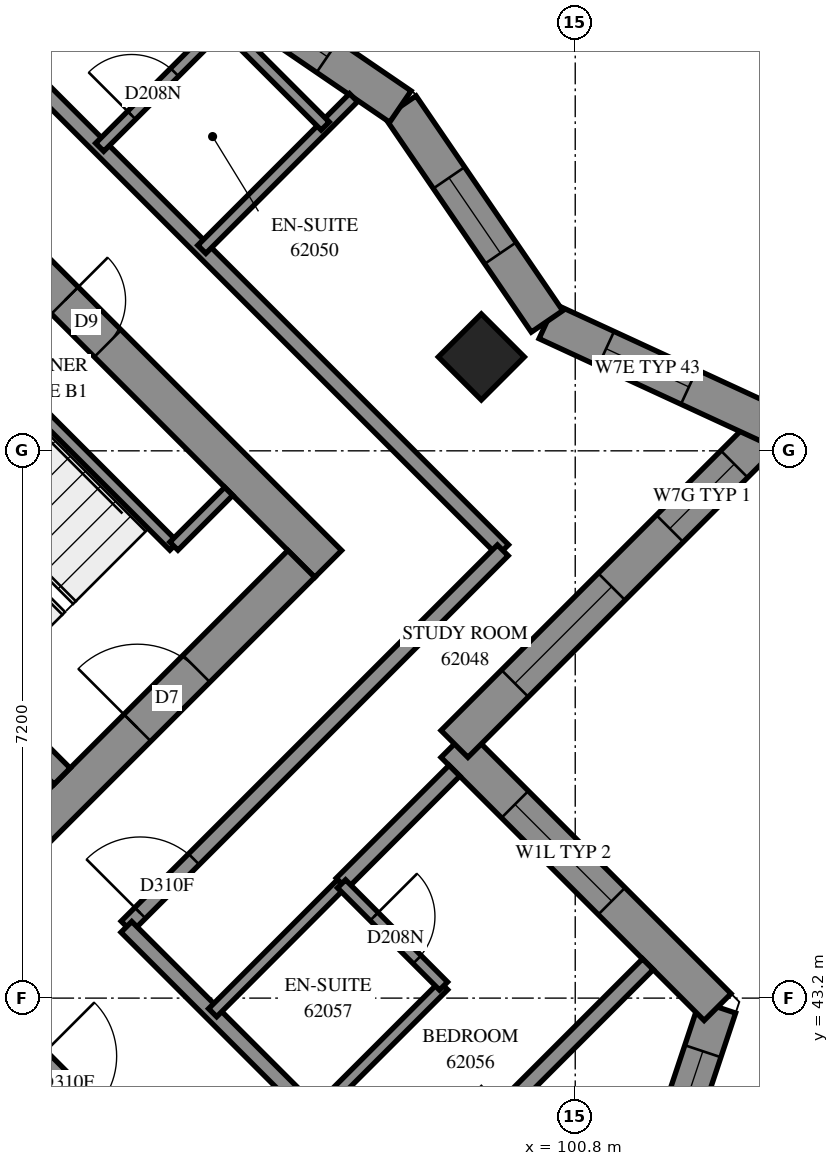
"""IFC4 building model, lengths in metres.
Left out: names, types, materials, properties, quantities, classifications, styles, units other than length and angle.
Written with IfcOpenShell. Run it as: python <this file> out.ifc"""

import sys

from ifc_helpers import new_model, si_unit, direction, frame, frame_2d, origin, origin_2d, place, context, subcontext, project, spatial, polyline, rectangle, outline, extrude, element, fill, save


model = new_model("IFC4")
c1 = context("Model", 3, precision=1e-05, world=origin(), true_north=direction((0.0, 1.0)))
c2 = subcontext(c1, "Body", "Model", "MODEL_VIEW")
j1 = project(units=[si_unit("LENGTHUNIT", "METRE"), si_unit("PLANEANGLEUNIT", "RADIAN")], contexts=[c1])
p1 = place(None, origin())
s1 = spatial("IfcSite", under=j1, at=p1, CompositionType="ELEMENT")
p2 = place(p1, origin())
s2 = spatial("IfcBuilding", under=s1, at=p2, CompositionType="ELEMENT")
p3 = place(p2, frame((0.0, 0.0, 227.0)))
s3 = spatial("IfcBuildingStorey", under=s2, at=p3, CompositionType="ELEMENT", Elevation=227.0)
p4 = place(p3, frame((99.565, 51.635, 0.0), z_axis=(0.0, 0.0, 1.0), x_axis=(0.7071067812, -0.7071067812, 0.0)))
e1 = element("IfcColumn", 1, at=p4, inside=s3, PredefinedType="COLUMN", context=c2, shape_type="SweptSolid", body=[
    extrude(rectangle(XDim=0.8, YDim=0.8, at=origin_2d()), origin(), (0.0, 0.0, 1.0), 3.1),
])
p5 = place(p3, frame((86.66, 59.802, -0.3), z_axis=(0.0, 0.0, 1.0), x_axis=(0.7071067812, -0.7071067812, 0.0)))
e2 = element("IfcWall", 2, at=p5, inside=s3, PredefinedType="SHEAR", context=c2, shape_type="SweptSolid", body=[
    extrude(rectangle(XDim=15.4, YDim=0.5, at=frame_2d((7.7, 0.0))), origin(), (0.0, 0.0, 1.0), 2.7),
])
p6 = place(p5, frame((10.5, 0.0, 0.3)))
e3 = element("IfcOpeningElement", 3, at=p6, cuts=e2, PredefinedType="OPENING", context=c2, shape_type="SweptSolid", body=[
    extrude(rectangle(XDim=0.8, YDim=2.1, at=frame_2d((0.4, 1.05))), frame((0.0, 0.26, 0.0), z_axis=(0.0, -1.0, 0.0), x_axis=(1.0, 0.0, 0.0)), (0.0, 0.0, 1.0), 0.52),
])
p7 = place(p3, frame((87.013, 38.731, -0.3), z_axis=(0.0, 0.0, 1.0), x_axis=(0.7071067812, 0.7071067812, 0.0)))
e4 = element("IfcWall", 4, at=p7, inside=s3, PredefinedType="SHEAR", context=c2, shape_type="SweptSolid", body=[
    extrude(rectangle(XDim=14.4, YDim=0.5, at=frame_2d((7.2, 0.0))), origin(), (0.0, 0.0, 1.0), 2.7),
])
p8 = place(p7, frame((4.55, 0.0, 0.3)))
e5 = element("IfcOpeningElement", 5, at=p8, cuts=e4, PredefinedType="OPENING", context=c2, shape_type="SweptSolid", body=[
    extrude(rectangle(XDim=1.1, YDim=2.1, at=frame_2d((0.55, 1.05))), frame((0.0, 0.26, 0.0), z_axis=(0.0, -1.0, 0.0), x_axis=(1.0, 0.0, 0.0)), (0.0, 0.0, 1.0), 0.52),
])
p9 = place(p7, frame((11.35, 0.0, 0.3)))
e6 = element("IfcOpeningElement", 6, at=p9, cuts=e4, PredefinedType="OPENING", context=c2, shape_type="SweptSolid", body=[
    extrude(rectangle(XDim=1.1, YDim=2.1, at=frame_2d((0.55, 1.05))), frame((0.0, 0.26, 0.0), z_axis=(0.0, -1.0, 0.0), x_axis=(1.0, 0.0, 0.0)), (0.0, 0.0, 1.0), 0.52),
])
p10 = place(p3, frame((88.958, 51.211, 0.0), z_axis=(0.0, 0.0, 1.0), x_axis=(0.7070998367, -0.7071137256, 0.0)))
e7 = element("IfcWall", 7, at=p10, inside=s3, PredefinedType="SOLIDWALL", context=c2, shape_type="SweptSolid", body=[
    extrude(rectangle(XDim=7.2, YDim=0.3, at=frame_2d((3.6, 0.0))), origin(), (0.0, 0.0, 1.0), 3.1),
])
p11 = place(p3, frame((101.062, 38.252, 0.0), z_axis=(0.0, 0.0, 1.0), x_axis=(0.3162395484, 0.9486793705, 0.0)))
e8 = element("IfcWall", 8, at=p11, inside=s3, PredefinedType="SOLIDWALL", context=c2, shape_type="SweptSolid", body=[
    extrude(outline(polyline([(-0.12, -0.25), (5.247, -0.25), (4.938, 0.25), (0.12, 0.25), (-0.12, -0.25)])), origin(), (0.0, 0.0, 1.0), 3.1),
])
p12 = place(p11, frame((1.68, 0.0, 0.45)))
e9 = element("IfcOpeningElement", 9, at=p12, cuts=e8, PredefinedType="OPENING", context=c2, shape_type="SweptSolid", body=[
    extrude(rectangle(XDim=1.3, YDim=2.5, at=frame_2d((0.65, 1.25))), frame((0.0, 0.26, 0.0), z_axis=(0.0, -1.0, 0.0), x_axis=(1.0, 0.0, 0.0)), (0.0, 0.0, 1.0), 0.52),
])
p13 = place(p11, frame((3.18, 0.0, 0.45)))
e10 = element("IfcOpeningElement", 10, at=p13, cuts=e8, PredefinedType="OPENING", context=c2, shape_type="SweptSolid", body=[
    extrude(rectangle(XDim=1.3, YDim=2.5, at=frame_2d((0.65, 1.25))), frame((0.0, 0.26, 0.0), z_axis=(0.0, -1.0, 0.0), x_axis=(1.0, 0.0, 0.0)), (0.0, 0.0, 1.0), 0.52),
])
p14 = place(p3, frame((102.673, 43.083, 0.0), z_axis=(0.0, 0.0, 1.0), x_axis=(-0.7071067812, 0.7071067812, 0.0)))
e11 = element("IfcWall", 11, at=p14, inside=s3, PredefinedType="SOLIDWALL", context=c2, shape_type="SweptSolid", body=[
    extrude(outline(polyline([(-0.154, -0.25), (4.646, -0.25), (5.146, 0.25), (0.154, 0.25), (-0.154, -0.25)])), origin(), (0.0, 0.0, 1.0), 3.1),
])
p15 = place(p14, frame((1.97, 0.0, 0.6)))
e12 = element("IfcOpeningElement", 12, at=p15, cuts=e11, PredefinedType="OPENING", context=c2, shape_type="SweptSolid", body=[
    extrude(rectangle(XDim=1.8, YDim=1.9, at=frame_2d((0.9, 0.95))), frame((0.0, 0.26, 0.0), z_axis=(0.0, -1.0, 0.0), x_axis=(1.0, 0.0, 0.0)), (0.0, 0.0, 1.0), 0.52),
])
p16 = place(p3, frame((99.211, 46.544, 0.0), z_axis=(0.0, 0.0, 1.0), x_axis=(0.7071067812, 0.7071067812, 0.0)))
e13 = element("IfcWall", 13, at=p16, inside=s3, PredefinedType="SOLIDWALL", context=c2, shape_type="SweptSolid", body=[
    extrude(outline(polyline([(0.25, -0.25), (6.28, -0.25), (5.563, 0.25), (-0.25, 0.25), (0.25, -0.25)])), origin(), (0.0, 0.0, 1.0), 3.1),
])
p17 = place(p16, frame((1.125, 0.0, 0.6)))
e14 = element("IfcOpeningElement", 14, at=p17, cuts=e13, PredefinedType="OPENING", context=c2, shape_type="SweptSolid", body=[
    extrude(rectangle(XDim=1.8, YDim=1.9, at=frame_2d((0.9, 0.95))), frame((0.0, 0.26, 0.0), z_axis=(0.0, -1.0, 0.0), x_axis=(1.0, 0.0, 0.0)), (0.0, 0.0, 1.0), 0.52),
])
p18 = place(p16, frame((4.006, 0.0, 0.6)))
e15 = element("IfcOpeningElement", 15, at=p18, cuts=e13, PredefinedType="OPENING", context=c2, shape_type="SweptSolid", body=[
    extrude(rectangle(XDim=1.2, YDim=1.9, at=frame_2d((0.6, 0.95))), frame((0.0, 0.26, 0.0), z_axis=(0.0, -1.0, 0.0), x_axis=(1.0, 0.0, 0.0)), (0.0, 0.0, 1.0), 0.52),
])
p19 = place(p3, frame((103.398, 50.731, 0.0), z_axis=(0.0, 0.0, 1.0), x_axis=(-0.9078591394, 0.4192753069, 0.0)))
e16 = element("IfcWall", 16, at=p19, inside=s3, PredefinedType="SOLIDWALL", context=c2, shape_type="SweptSolid", body=[
    extrude(outline(polyline([(-0.358, -0.25), (3.202, -0.25), (3.34, 0.25), (0.358, 0.25), (-0.358, -0.25)])), origin(), (0.0, 0.0, 1.0), 3.1),
])
p20 = place(p19, frame((1.215, 0.0, 0.45)))
e17 = element("IfcOpeningElement", 17, at=p20, cuts=e16, PredefinedType="OPENING", context=c2, shape_type="SweptSolid", body=[
    extrude(rectangle(XDim=1.2, YDim=2.5, at=frame_2d((0.6, 1.25))), frame((0.0, 0.26, 0.0), z_axis=(0.0, -1.0, 0.0), x_axis=(1.0, 0.0, 0.0)), (0.0, 0.0, 1.0), 0.52),
])
p21 = place(p3, frame((100.429, 52.103, 0.0), z_axis=(0.0, 0.0, 1.0), x_axis=(-0.563838178, 0.8258852881, 0.0)))
e18 = element("IfcWall", 18, at=p21, inside=s3, PredefinedType="SOLIDWALL", context=c2, shape_type="SweptSolid", body=[
    extrude(outline(polyline([(0.069, -0.25), (3.469, -0.25), (3.375, 0.25), (-0.069, 0.25), (0.069, -0.25)])), origin(), (0.0, 0.0, 1.0), 3.1),
])
p22 = place(p21, frame((1.087, 0.0, 0.45)))
e19 = element("IfcOpeningElement", 19, at=p22, cuts=e18, PredefinedType="OPENING", context=c2, shape_type="SweptSolid", body=[
    extrude(rectangle(XDim=1.2, YDim=2.5, at=frame_2d((0.6, 1.25))), frame((0.0, 0.26, 0.0), z_axis=(0.0, -1.0, 0.0), x_axis=(1.0, 0.0, 0.0)), (0.0, 0.0, 1.0), 0.52),
])
p23 = place(p3, frame((98.499, 54.929, 0.0), z_axis=(0.0, 0.0, 1.0), x_axis=(-0.8258911763, 0.5638295531, 0.0)))
e20 = element("IfcWall", 20, at=p23, inside=s3, PredefinedType="SOLIDWALL", context=c2, shape_type="SweptSolid", body=[
    extrude(outline(polyline([(-0.047, -0.25), (3.353, -0.25), (3.447, 0.25), (0.047, 0.25), (-0.047, -0.25)])), origin(), (0.0, 0.0, 1.0), 3.1),
])
p24 = place(p23, frame((1.163, 0.0, 0.45)))
e21 = element("IfcOpeningElement", 21, at=p24, cuts=e20, PredefinedType="OPENING", context=c2, shape_type="SweptSolid", body=[
    extrude(rectangle(XDim=1.2, YDim=2.5, at=frame_2d((0.6, 1.25))), frame((0.0, 0.26, 0.0), z_axis=(0.0, -1.0, 0.0), x_axis=(1.0, 0.0, 0.0)), (0.0, 0.0, 1.0), 0.52),
])
p25 = place(p3, frame((91.313, 53.354, 0.0), z_axis=(0.0, 0.0, 1.0), x_axis=(0.7071067812, -0.7071067812, 0.0)))
e22 = element("IfcWall", 22, at=p25, inside=s3, PredefinedType="PARTITIONING", context=c2, shape_type="SweptSolid", body=[
    extrude(rectangle(XDim=5.95, YDim=0.15, at=frame_2d((2.975, 0.0))), origin(), (0.0, 0.0, 1.0), 3.1),
])
p26 = place(p3, frame((95.52, 49.146, 0.0), z_axis=(0.0, 0.0, 1.0), x_axis=(0.7071067812, 0.7071067812, 0.0)))
e23 = element("IfcWall", 23, at=p26, inside=s3, PredefinedType="PARTITIONING", context=c2, shape_type="SweptSolid", body=[
    extrude(rectangle(XDim=1.02, YDim=0.15, at=frame_2d((0.51, 0.0))), origin(), (0.0, 0.0, 1.0), 3.1),
])
p27 = place(p3, frame((93.346, 55.599, 0.0), z_axis=(0.0, 0.0, 1.0), x_axis=(0.7071067812, -0.7071067812, 0.0)))
e24 = element("IfcWall", 24, at=p27, inside=s3, PredefinedType="PARTITIONING", context=c2, shape_type="SweptSolid", body=[
    extrude(rectangle(XDim=9.201, YDim=0.2, at=frame_2d((4.601, 0.0))), origin(), (0.0, 0.0, 1.0), 3.1),
])
p28 = place(p3, frame((94.897, 44.141, 0.0), z_axis=(0.0, 0.0, 1.0), x_axis=(0.7071067812, 0.7071067812, 0.0)))
e25 = element("IfcWall", 25, at=p28, inside=s3, PredefinedType="PARTITIONING", context=c2, shape_type="SweptSolid", body=[
    extrude(rectangle(XDim=7.0, YDim=0.2, at=frame_2d((3.5, 0.0))), origin(), (0.0, 0.0, 1.0), 3.1),
])
p29 = place(p28, frame((0.253, 0.0, 0.0)))
e26 = element("IfcOpeningElement", 26, at=p29, cuts=e25, PredefinedType="OPENING", context=c2, shape_type="SweptSolid", body=[
    extrude(rectangle(XDim=1.0, YDim=2.1, at=frame_2d((0.5, 1.05))), frame((0.0, 0.11, 0.0), z_axis=(0.0, -1.0, 0.0), x_axis=(1.0, 0.0, 0.0)), (0.0, 0.0, 1.0), 0.22),
])
p30 = place(p3, frame((94.895, 44.137, 0.0), z_axis=(0.0, 0.0, 1.0), x_axis=(0.7071067812, -0.7071067812, 0.0)))
e27 = element("IfcWall", 27, at=p30, inside=s3, PredefinedType="PARTITIONING", context=c2, shape_type="SweptSolid", body=[
    extrude(rectangle(XDim=5.199, YDim=0.2, at=frame_2d((2.599, 0.0))), origin(), (0.0, 0.0, 1.0), 3.1),
])
p31 = place(p30, frame((3.898, 0.0, 0.0)))
e28 = element("IfcOpeningElement", 28, at=p31, cuts=e27, PredefinedType="OPENING", context=c2, shape_type="SweptSolid", body=[
    extrude(rectangle(XDim=0.9, YDim=2.1, at=frame_2d((0.45, 1.05))), frame((0.0, 0.11, 0.0), z_axis=(0.0, -1.0, 0.0), x_axis=(1.0, 0.0, 0.0)), (0.0, 0.0, 1.0), 0.22),
])
p32 = place(p3, frame((93.621, 42.581, 0.0), z_axis=(0.0, 0.0, 1.0), x_axis=(0.7071067812, -0.7071067812, 0.0)))
e29 = element("IfcWall", 29, at=p32, inside=s3, PredefinedType="PARTITIONING", context=c2, shape_type="SweptSolid", body=[
    extrude(rectangle(XDim=3.1, YDim=0.2, at=frame_2d((1.55, 0.0))), origin(), (0.0, 0.0, 1.0), 3.1),
])
p33 = place(p32, frame((0.206, 0.0, 0.0)))
e30 = element("IfcOpeningElement", 30, at=p33, cuts=e29, PredefinedType="OPENING", context=c2, shape_type="SweptSolid", body=[
    extrude(rectangle(XDim=1.0, YDim=2.1, at=frame_2d((0.5, 1.05))), frame((0.0, 0.11, 0.0), z_axis=(0.0, -1.0, 0.0), x_axis=(1.0, 0.0, 0.0)), (0.0, 0.0, 1.0), 0.22),
])
p34 = place(p32, frame((1.8, 0.0, 0.0)))
e31 = element("IfcOpeningElement", 31, at=p34, cuts=e29, PredefinedType="OPENING", context=c2, shape_type="SweptSolid", body=[
    extrude(rectangle(XDim=0.9, YDim=2.1, at=frame_2d((0.45, 1.05))), frame((0.0, 0.11, 0.0), z_axis=(0.0, -1.0, 0.0), x_axis=(1.0, 0.0, 0.0)), (0.0, 0.0, 1.0), 0.22),
])
p35 = place(p3, frame((95.887, 53.051, 0.0), z_axis=(0.0, 0.0, 1.0), x_axis=(0.7070890683, 0.7071244936, 0.0)))
e32 = element("IfcWall", 32, at=p35, inside=s3, PredefinedType="PARTITIONING", context=c2, shape_type="SweptSolid", body=[
    extrude(rectangle(XDim=2.823, YDim=0.15, at=frame_2d((1.411, 0.0))), origin(), (0.0, 0.0, 1.0), 3.1),
])
p36 = place(p3, frame((95.566, 56.618, 0.0), z_axis=(0.0, 0.0, 1.0), x_axis=(0.7071067812, -0.7071067812, 0.0)))
e33 = element("IfcWall", 33, at=p36, inside=s3, PredefinedType="PARTITIONING", context=c2, shape_type="SweptSolid", body=[
    extrude(rectangle(XDim=2.751, YDim=0.15, at=frame_2d((1.375, 0.0))), origin(), (0.0, 0.0, 1.0), 3.1),
])
p37 = place(p3, frame((99.964, 41.854, 0.0), z_axis=(0.0, 0.0, 1.0), x_axis=(0.7071265121, 0.7070870497, 0.0)))
e34 = element("IfcWall", 34, at=p37, inside=s3, PredefinedType="PARTITIONING", context=c2, shape_type="SweptSolid", body=[
    extrude(rectangle(XDim=2.534, YDim=0.2, at=frame_2d((1.267, 0.0))), origin(), (0.0, 0.0, 1.0), 3.1),
])
p38 = place(p3, frame((94.544, 54.394, 0.0), z_axis=(0.0, 0.0, 1.0), x_axis=(0.7071067812, 0.7071067812, 0.0)))
e35 = element("IfcWall", 35, at=p38, inside=s3, PredefinedType="PARTITIONING", context=c2, shape_type="SweptSolid", body=[
    extrude(rectangle(XDim=2.465, YDim=0.15, at=frame_2d((1.232, 0.0))), origin(), (0.0, 0.0, 1.0), 3.1),
])
p39 = place(p38, frame((0.594, 0.0, 0.0)))
e36 = element("IfcOpeningElement", 36, at=p39, cuts=e35, PredefinedType="OPENING", context=c2, shape_type="SweptSolid", body=[
    extrude(rectangle(XDim=0.8, YDim=2.1, at=frame_2d((0.4, 1.05))), frame((0.0, 0.085, 0.0), z_axis=(0.0, -1.0, 0.0), x_axis=(1.0, 0.0, 0.0)), (0.0, 0.0, 1.0), 0.17),
])
for number, where, z_axis, x_axis in (
    (37, (97.371, 41.667, 0.0), (0.0, 0.0, 1.0), (0.708, 0.707, 0.0)),
    (38, (96.03, 43.008, 0.0), (0.0, 0.0, 1.0), (0.707, 0.708, 0.0)),
):
    element("IfcWall", number, at=place(p3, frame(where, z_axis=z_axis, x_axis=x_axis)), inside=s3, PredefinedType="PARTITIONING", context=c2, shape_type="SweptSolid", body=[
        extrude(rectangle(XDim=2.4, YDim=0.15, at=frame_2d((1.2, 0.0))), origin(), (0.0, 0.0, 1.0), 3.1),
    ])
p40 = place(p3, frame((97.726, 44.708, 0.0), z_axis=(0.0, 0.0, 1.0), x_axis=(0.7071067812, 0.7071067812, 0.0)))
e39 = element("IfcWall", 39, at=p40, inside=s3, PredefinedType="PARTITIONING", context=c2, shape_type="SweptSolid", body=[
    extrude(rectangle(XDim=2.099, YDim=0.2, at=frame_2d((1.049, 0.0))), origin(), (0.0, 0.0, 1.0), 3.1),
])
p41 = place(p3, frame((97.725, 44.703, 0.0), z_axis=(0.0, 0.0, 1.0), x_axis=(0.7065800724, -0.7076330979, 0.0)))
e40 = element("IfcWall", 40, at=p41, inside=s3, PredefinedType="PARTITIONING", context=c2, shape_type="SweptSolid", body=[
    extrude(rectangle(XDim=1.899, YDim=0.15, at=frame_2d((0.95, 0.0))), origin(), (0.0, 0.0, 1.0), 3.1),
])
p42 = place(p41, frame((0.608, 0.0, 0.0)))
e41 = element("IfcOpeningElement", 41, at=p42, cuts=e40, PredefinedType="OPENING", context=c2, shape_type="SweptSolid", body=[
    extrude(rectangle(XDim=0.8, YDim=2.1, at=frame_2d((0.4, 1.05))), frame((0.0, 0.085, 0.0), z_axis=(0.0, -1.0, 0.0), x_axis=(1.0, 0.0, 0.0)), (0.0, 0.0, 1.0), 0.17),
])
p43 = place(p13, origin())
e42 = element("IfcWindow", 42, at=p43, inside=s3, PartitioningType="SINGLE_PANEL", PredefinedType="WINDOW", context=c2, shape_type="SweptSolid", body=[
    extrude(rectangle(XDim=1.3, YDim=2.5, at=frame_2d((0.65, 1.25))), frame((0.0, 0.18, 0.0), z_axis=(0.0, -1.0, 0.0), x_axis=(1.0, 0.0, 0.0)), (0.0, 0.0, 1.0), 0.06),
])
fill(e10, e42)
p44 = place(p15, origin())
e43 = element("IfcWindow", 43, at=p44, inside=s3, PartitioningType="SINGLE_PANEL", PredefinedType="WINDOW", context=c2, shape_type="SweptSolid", body=[
    extrude(rectangle(XDim=1.8, YDim=1.9, at=frame_2d((0.9, 0.95))), frame((0.0, 0.18, 0.0), z_axis=(0.0, -1.0, 0.0), x_axis=(1.0, 0.0, 0.0)), (0.0, 0.0, 1.0), 0.06),
])
fill(e12, e43)
p45 = place(p17, origin())
e44 = element("IfcWindow", 44, at=p45, inside=s3, PartitioningType="SINGLE_PANEL", PredefinedType="WINDOW", context=c2, shape_type="SweptSolid", body=[
    extrude(rectangle(XDim=1.8, YDim=1.9, at=frame_2d((0.9, 0.95))), frame((0.0, 0.18, 0.0), z_axis=(0.0, -1.0, 0.0), x_axis=(1.0, 0.0, 0.0)), (0.0, 0.0, 1.0), 0.06),
])
fill(e14, e44)
p46 = place(p18, origin())
e45 = element("IfcWindow", 45, at=p46, inside=s3, PartitioningType="SINGLE_PANEL", PredefinedType="WINDOW", context=c2, shape_type="SweptSolid", body=[
    extrude(rectangle(XDim=1.2, YDim=1.9, at=frame_2d((0.6, 0.95))), frame((0.0, 0.18, 0.0), z_axis=(0.0, -1.0, 0.0), x_axis=(1.0, 0.0, 0.0)), (0.0, 0.0, 1.0), 0.06),
])
fill(e15, e45)
p47 = place(p20, origin())
e46 = element("IfcWindow", 46, at=p47, inside=s3, PartitioningType="SINGLE_PANEL", PredefinedType="WINDOW", context=c2, shape_type="SweptSolid", body=[
    extrude(rectangle(XDim=1.2, YDim=2.5, at=frame_2d((0.6, 1.25))), frame((0.0, 0.18, 0.0), z_axis=(0.0, -1.0, 0.0), x_axis=(1.0, 0.0, 0.0)), (0.0, 0.0, 1.0), 0.06),
])
fill(e17, e46)
p48 = place(p22, origin())
e47 = element("IfcWindow", 47, at=p48, inside=s3, PartitioningType="SINGLE_PANEL", PredefinedType="WINDOW", context=c2, shape_type="SweptSolid", body=[
    extrude(rectangle(XDim=1.2, YDim=2.5, at=frame_2d((0.6, 1.25))), frame((0.0, 0.18, 0.0), z_axis=(0.0, -1.0, 0.0), x_axis=(1.0, 0.0, 0.0)), (0.0, 0.0, 1.0), 0.06),
])
fill(e19, e47)
p49 = place(p24, origin())
e48 = element("IfcWindow", 48, at=p49, inside=s3, PartitioningType="SINGLE_PANEL", PredefinedType="WINDOW", context=c2, shape_type="SweptSolid", body=[
    extrude(rectangle(XDim=1.2, YDim=2.5, at=frame_2d((0.6, 1.25))), frame((0.0, 0.18, 0.0), z_axis=(0.0, -1.0, 0.0), x_axis=(1.0, 0.0, 0.0)), (0.0, 0.0, 1.0), 0.06),
])
fill(e21, e48)
p50 = place(p6, origin())
e49 = element("IfcDoor", 49, at=p50, inside=s3, OperationType="SINGLE_SWING_RIGHT", PredefinedType="DOOR", context=c2, shape_type="SweptSolid", body=[
    extrude(rectangle(XDim=0.8, YDim=2.1, at=frame_2d((0.4, 1.05))), frame((0.0, 0.025, 0.0), z_axis=(0.0, -1.0, 0.0), x_axis=(1.0, 0.0, 0.0)), (0.0, 0.0, 1.0), 0.05),
])
fill(e3, e49)
p51 = place(p9, origin())
e50 = element("IfcDoor", 50, at=p51, inside=s3, OperationType="SINGLE_SWING_RIGHT", PredefinedType="DOOR", context=c2, shape_type="SweptSolid", body=[
    extrude(rectangle(XDim=1.1, YDim=2.1, at=frame_2d((0.55, 1.05))), frame((0.0, 0.025, 0.0), z_axis=(0.0, -1.0, 0.0), x_axis=(1.0, 0.0, 0.0)), (0.0, 0.0, 1.0), 0.05),
])
fill(e6, e50)
p52 = place(p29, origin())
e51 = element("IfcDoor", 51, at=p52, inside=s3, OperationType="SINGLE_SWING_RIGHT", PredefinedType="DOOR", context=c2, shape_type="SweptSolid", body=[
    extrude(rectangle(XDim=1.0, YDim=2.1, at=frame_2d((0.5, 1.05))), frame((0.0, 0.025, 0.0), z_axis=(0.0, -1.0, 0.0), x_axis=(1.0, 0.0, 0.0)), (0.0, 0.0, 1.0), 0.05),
])
fill(e26, e51)
p53 = place(p39, origin())
e52 = element("IfcDoor", 52, at=p53, inside=s3, OperationType="SINGLE_SWING_RIGHT", PredefinedType="DOOR", context=c2, shape_type="SweptSolid", body=[
    extrude(rectangle(XDim=0.8, YDim=2.1, at=frame_2d((0.4, 1.05))), frame((0.0, 0.025, 0.0), z_axis=(0.0, -1.0, 0.0), x_axis=(1.0, 0.0, 0.0)), (0.0, 0.0, 1.0), 0.05),
])
fill(e36, e52)
p54 = place(p33, origin())
e53 = element("IfcDoor", 53, at=p54, inside=s3, OperationType="SINGLE_SWING_RIGHT", PredefinedType="DOOR", context=c2, shape_type="SweptSolid", body=[
    extrude(rectangle(XDim=1.0, YDim=2.1, at=frame_2d((0.5, 1.05))), frame((0.0, 0.025, 0.0), z_axis=(0.0, -1.0, 0.0), x_axis=(1.0, 0.0, 0.0)), (0.0, 0.0, 1.0), 0.05),
])
fill(e30, e53)
p55 = place(p42, origin())
e54 = element("IfcDoor", 54, at=p55, inside=s3, OperationType="SINGLE_SWING_RIGHT", PredefinedType="DOOR", context=c2, shape_type="SweptSolid", body=[
    extrude(rectangle(XDim=0.8, YDim=2.1, at=frame_2d((0.4, 1.05))), frame((0.0, 0.025, 0.0), z_axis=(0.0, -1.0, 0.0), x_axis=(1.0, 0.0, 0.0)), (0.0, 0.0, 1.0), 0.05),
])
fill(e41, e54)
save(model, sys.argv[1])
